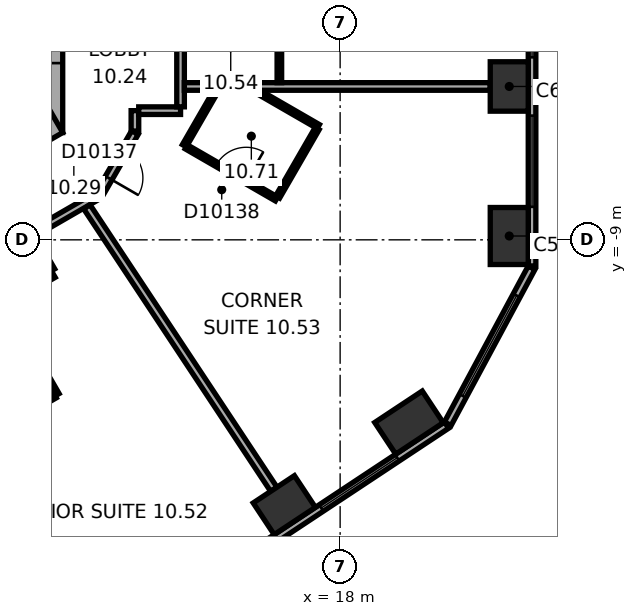
"""IFC4 building model, lengths in metres.
Left out: names, types, materials, properties, quantities, classifications, styles, units other than length and angle.
Written with IfcOpenShell. Run it as: python <this file> out.ifc"""

import sys

from ifc_helpers import new_model, si_unit, direction, frame, frame_2d, origin, origin_2d, place, context, subcontext, project, spatial, rectangle, extrude, element, fill, save


model = new_model("IFC4")
c1 = context("Model", 3, precision=1e-05, world=origin(), true_north=direction((0.0, 1.0)))
c2 = subcontext(c1, "Body", "Model", "MODEL_VIEW")
j1 = project(units=[si_unit("LENGTHUNIT", "METRE"), si_unit("PLANEANGLEUNIT", "RADIAN")], contexts=[c1])
p1 = place(None, origin())
s1 = spatial("IfcSite", under=j1, at=p1, CompositionType="ELEMENT")
p2 = place(p1, origin())
s2 = spatial("IfcBuilding", under=s1, at=p2, CompositionType="ELEMENT")
p3 = place(p2, frame((0.0, 0.0, 53.9)))
s3 = spatial("IfcBuildingStorey", under=s2, at=p3, CompositionType="ELEMENT", Elevation=53.9)
p4 = place(p3, frame((22.45, -8.899, 0.0), z_axis=(0.0, 0.0, 1.0), x_axis=(0.0, 1.0, 0.0)))
e1 = element("IfcColumn", 1, at=p4, inside=s3, PredefinedType="COLUMN", context=c2, shape_type="SweptSolid", body=[
    extrude(rectangle(XDim=1.5, YDim=1.0, at=origin_2d()), origin(), (0.0, 0.0, 1.0), 3.3),
])
for number, where, z_axis, x_axis in (
    (2, (22.45, -4.965, 0.0), (0.0, 0.0, 1.0), (0.0, 1.0, 0.0)),
    (3, (16.531, -15.981, 0.0), (0.0, 0.0, 1.0), (0.834, 0.552, 0.0)),
):
    element("IfcColumn", number, at=place(p3, frame(where, z_axis=z_axis, x_axis=x_axis)), inside=s3, PredefinedType="COLUMN", context=c2, shape_type="SweptSolid", body=[
        extrude(rectangle(XDim=1.3, YDim=1.0, at=origin_2d()), origin(), (0.0, 0.0, 1.0), 3.3),
    ])
p5 = place(p3, frame((19.812, -13.809, 0.0), z_axis=(0.0, 0.0, 1.0), x_axis=(0.833885822067, 0.551936985312, 0.0)))
e4 = element("IfcColumn", 4, at=p5, inside=s3, PredefinedType="COLUMN", context=c2, shape_type="SweptSolid", body=[
    extrude(rectangle(XDim=1.5, YDim=1.0, at=origin_2d()), origin(), (0.0, 0.0, 1.0), 3.3),
])
p6 = place(p3, frame((10.1, -6.177, 0.0), z_axis=(0.0, 0.0, 1.0), x_axis=(0.0, 1.0, 0.0)))
e5 = element("IfcWall", 5, at=p6, inside=s3, PredefinedType="SHEAR", context=c2, shape_type="SweptSolid", body=[
    extrude(rectangle(XDim=12.355, YDim=1.2, at=frame_2d((6.177, 0.0))), origin(), (0.0, 0.0, 1.0), 3.3),
])
p7 = place(p6, frame((6.378, 0.0, 0.0)))
e6 = element("IfcOpeningElement", 6, at=p7, cuts=e5, PredefinedType="OPENING", context=c2, shape_type="SweptSolid", body=[
    extrude(rectangle(XDim=1.5, YDim=2.1, at=frame_2d((0.75, 1.05))), frame((0.0, 0.61, 0.0), z_axis=(0.0, -1.0, 0.0), x_axis=(1.0, 0.0, 0.0)), (0.0, 0.0, 1.0), 1.22),
])
p8 = place(p6, frame((1.828, 0.0, 0.0)))
e7 = element("IfcOpeningElement", 7, at=p8, cuts=e5, PredefinedType="OPENING", context=c2, shape_type="SweptSolid", body=[
    extrude(rectangle(XDim=1.1, YDim=2.1, at=frame_2d((0.55, 1.05))), frame((0.0, 0.61, 0.0), z_axis=(0.0, -1.0, 0.0), x_axis=(1.0, 0.0, 0.0)), (0.0, 0.0, 1.0), 1.22),
])
p9 = place(p6, frame((4.427, 0.0, 0.0)))
e8 = element("IfcOpeningElement", 8, at=p9, cuts=e5, PredefinedType="OPENING", context=c2, shape_type="SweptSolid", body=[
    extrude(rectangle(XDim=1.1, YDim=2.1, at=frame_2d((0.55, 1.05))), frame((0.0, 0.61, 0.0), z_axis=(0.0, -1.0, 0.0), x_axis=(1.0, 0.0, 0.0)), (0.0, 0.0, 1.0), 1.22),
])
p10 = place(p3, frame((-0.3, -11.836, 0.0), z_axis=(0.0, 0.0, 1.0), x_axis=(0.866021384402, 0.500006961711, 0.0)))
e9 = element("IfcWall", 9, at=p10, inside=s3, PredefinedType="SHEAR", context=c2, shape_type="SweptSolid", body=[
    extrude(rectangle(XDim=12.355, YDim=1.2, at=frame_2d((6.178, 0.0))), origin(), (0.0, 0.0, 1.0), 3.3),
])
p11 = place(p10, frame((4.128, 0.0, 0.0)))
e10 = element("IfcOpeningElement", 10, at=p11, cuts=e9, PredefinedType="OPENING", context=c2, shape_type="SweptSolid", body=[
    extrude(rectangle(XDim=0.9, YDim=2.1, at=frame_2d((0.45, 1.05))), frame((0.0, 0.61, 0.0), z_axis=(0.0, -1.0, 0.0), x_axis=(1.0, 0.0, 0.0)), (0.0, 0.0, 1.0), 1.22),
])
p12 = place(p10, frame((7.928, 0.0, 0.0)))
e11 = element("IfcOpeningElement", 11, at=p12, cuts=e9, PredefinedType="OPENING", context=c2, shape_type="SweptSolid", body=[
    extrude(rectangle(XDim=1.1, YDim=2.1, at=frame_2d((0.55, 1.05))), frame((0.0, 0.61, 0.0), z_axis=(0.0, -1.0, 0.0), x_axis=(1.0, 0.0, 0.0)), (0.0, 0.0, 1.0), 1.22),
])
p13 = place(p3, frame((23.05, -9.687, 0.0), z_axis=(0.0, 0.0, 1.0), x_axis=(0.0, 1.0, 0.0)))
e12 = element("IfcWall", 12, at=p13, inside=s3, PredefinedType="STANDARD", context=c2, shape_type="SweptSolid", body=[
    extrude(rectangle(XDim=21.246, YDim=0.2, at=frame_2d((10.623, 0.0))), origin(), (0.0, 0.0, 1.0), 3.3),
])
p14 = place(p13, frame((1.555, 0.0, 0.8)))
e13 = element("IfcOpeningElement", 13, at=p14, cuts=e12, PredefinedType="OPENING", context=c2, shape_type="SweptSolid", body=[
    extrude(rectangle(XDim=2.4, YDim=1.7, at=frame_2d((1.2, 0.85))), frame((0.0, 0.11, 0.0), z_axis=(0.0, -1.0, 0.0), x_axis=(1.0, 0.0, 0.0)), (0.0, 0.0, 1.0), 0.22),
])
p15 = place(p13, frame((5.489, 0.0, 0.8)))
e14 = element("IfcOpeningElement", 14, at=p15, cuts=e12, PredefinedType="OPENING", context=c2, shape_type="SweptSolid", body=[
    extrude(rectangle(XDim=2.4, YDim=1.7, at=frame_2d((1.2, 0.85))), frame((0.0, 0.11, 0.0), z_axis=(0.0, -1.0, 0.0), x_axis=(1.0, 0.0, 0.0)), (0.0, 0.0, 1.0), 0.22),
])
p16 = place(p13, frame((9.424, 0.0, 0.8)))
e15 = element("IfcOpeningElement", 15, at=p16, cuts=e12, PredefinedType="OPENING", context=c2, shape_type="SweptSolid", body=[
    extrude(rectangle(XDim=2.4, YDim=1.7, at=frame_2d((1.2, 0.85))), frame((0.0, 0.11, 0.0), z_axis=(0.0, -1.0, 0.0), x_axis=(1.0, 0.0, 0.0)), (0.0, 0.0, 1.0), 0.22),
])
p17 = place(p13, frame((13.358, 0.0, 0.8)))
e16 = element("IfcOpeningElement", 16, at=p17, cuts=e12, PredefinedType="OPENING", context=c2, shape_type="SweptSolid", body=[
    extrude(rectangle(XDim=2.4, YDim=1.7, at=frame_2d((1.2, 0.85))), frame((0.0, 0.11, 0.0), z_axis=(0.0, -1.0, 0.0), x_axis=(1.0, 0.0, 0.0)), (0.0, 0.0, 1.0), 0.22),
])
p18 = place(p13, frame((17.293, 0.0, 0.8)))
e17 = element("IfcOpeningElement", 17, at=p18, cuts=e12, PredefinedType="OPENING", context=c2, shape_type="SweptSolid", body=[
    extrude(rectangle(XDim=2.4, YDim=1.7, at=frame_2d((1.2, 0.85))), frame((0.0, 0.11, 0.0), z_axis=(0.0, -1.0, 0.0), x_axis=(1.0, 0.0, 0.0)), (0.0, 0.0, 1.0), 0.22),
])
p19 = place(p3, frame((3.083, -25.601, 0.0), z_axis=(0.0, 0.0, 1.0), x_axis=(0.833884295743, 0.551939291329, 0.0)))
e18 = element("IfcWall", 18, at=p19, inside=s3, PredefinedType="STANDARD", context=c2, shape_type="SweptSolid", body=[
    extrude(rectangle(XDim=21.246, YDim=0.2, at=frame_2d((10.623, 0.0))), origin(), (0.0, 0.0, 1.0), 3.3),
])
p20 = place(p19, frame((1.553, 0.0, 0.8)))
e19 = element("IfcOpeningElement", 19, at=p20, cuts=e18, PredefinedType="OPENING", context=c2, shape_type="SweptSolid", body=[
    extrude(rectangle(XDim=2.4, YDim=1.7, at=frame_2d((1.2, 0.85))), frame((0.0, 0.11, 0.0), z_axis=(0.0, -1.0, 0.0), x_axis=(1.0, 0.0, 0.0)), (0.0, 0.0, 1.0), 0.22),
])
p21 = place(p19, frame((5.488, 0.0, 0.8)))
e20 = element("IfcOpeningElement", 20, at=p21, cuts=e18, PredefinedType="OPENING", context=c2, shape_type="SweptSolid", body=[
    extrude(rectangle(XDim=2.4, YDim=1.7, at=frame_2d((1.2, 0.85))), frame((0.0, 0.11, 0.0), z_axis=(0.0, -1.0, 0.0), x_axis=(1.0, 0.0, 0.0)), (0.0, 0.0, 1.0), 0.22),
])
p22 = place(p19, frame((9.422, 0.0, 0.8)))
e21 = element("IfcOpeningElement", 21, at=p22, cuts=e18, PredefinedType="OPENING", context=c2, shape_type="SweptSolid", body=[
    extrude(rectangle(XDim=2.4, YDim=1.7, at=frame_2d((1.2, 0.85))), frame((0.0, 0.11, 0.0), z_axis=(0.0, -1.0, 0.0), x_axis=(1.0, 0.0, 0.0)), (0.0, 0.0, 1.0), 0.22),
])
p23 = place(p19, frame((13.357, 0.0, 0.8)))
e22 = element("IfcOpeningElement", 22, at=p23, cuts=e18, PredefinedType="OPENING", context=c2, shape_type="SweptSolid", body=[
    extrude(rectangle(XDim=2.4, YDim=1.7, at=frame_2d((1.2, 0.85))), frame((0.0, 0.11, 0.0), z_axis=(0.0, -1.0, 0.0), x_axis=(1.0, 0.0, 0.0)), (0.0, 0.0, 1.0), 0.22),
])
p24 = place(p19, frame((17.291, 0.0, 0.8)))
e23 = element("IfcOpeningElement", 23, at=p24, cuts=e18, PredefinedType="OPENING", context=c2, shape_type="SweptSolid", body=[
    extrude(rectangle(XDim=2.4, YDim=1.7, at=frame_2d((1.2, 0.85))), frame((0.0, 0.11, 0.0), z_axis=(0.0, -1.0, 0.0), x_axis=(1.0, 0.0, 0.0)), (0.0, 0.0, 1.0), 0.22),
])
p25 = place(p3, frame((20.833, -13.839, 0.0), z_axis=(0.0, 0.0, 1.0), x_axis=(0.473321668581, 0.880889662813, 0.0)))
e24 = element("IfcWall", 24, at=p25, inside=s3, PredefinedType="STANDARD", context=c2, shape_type="SweptSolid", body=[
    extrude(rectangle(XDim=4.66, YDim=0.2, at=frame_2d((2.33, 0.0))), origin(), (0.0, 0.0, 1.0), 3.3),
])
p26 = place(p25, frame((0.83, 0.0, 0.8)))
e25 = element("IfcOpeningElement", 25, at=p26, cuts=e24, PredefinedType="OPENING", context=c2, shape_type="SweptSolid", body=[
    extrude(rectangle(XDim=3.0, YDim=1.7, at=frame_2d((1.5, 0.85))), frame((0.0, 0.11, 0.0), z_axis=(0.0, -1.0, 0.0), x_axis=(1.0, 0.0, 0.0)), (0.0, 0.0, 1.0), 0.22),
])
p27 = place(p3, frame((7.385, -11.673, 0.0), z_axis=(0.0, 0.0, 1.0), x_axis=(0.866037524642, 0.499979005472, 0.0)))
e26 = element("IfcWall", 26, at=p27, inside=s3, PredefinedType="PARTITIONING", context=c2, shape_type="SweptSolid", body=[
    extrude(rectangle(XDim=3.542, YDim=0.2, at=frame_2d((1.771, 0.0))), origin(), (0.0, 0.0, 1.0), 3.05),
])
p28 = place(p3, frame((9.203, -10.738, 0.0), z_axis=(0.0, 0.0, 1.0), x_axis=(0.50000943426, -0.866019956843, 0.0)))
e27 = element("IfcWall", 27, at=p28, inside=s3, PredefinedType="PARTITIONING", context=c2, shape_type="SweptSolid", body=[
    extrude(rectangle(XDim=2.7, YDim=0.12, at=frame_2d((1.35, 0.0))), origin(), (0.0, 0.0, 1.0), 3.05),
])
p29 = place(p3, frame((9.852, -8.861, 0.0), z_axis=(0.0, 0.0, 1.0), x_axis=(0.866013291437, 0.500020978615, 0.0)))
e28 = element("IfcWall", 28, at=p29, inside=s3, PredefinedType="PARTITIONING", context=c2, shape_type="SweptSolid", body=[
    extrude(rectangle(XDim=2.077, YDim=0.2, at=frame_2d((1.038, 0.0))), origin(), (0.0, 0.0, 1.0), 3.05),
])
p30 = place(p3, frame((10.402, -9.815, 0.0), z_axis=(0.0, 0.0, 1.0), x_axis=(-0.499968756647, 0.866043441391, 0.0)))
e29 = element("IfcWall", 29, at=p30, inside=s3, PredefinedType="PARTITIONING", context=c2, shape_type="SweptSolid", body=[
    extrude(rectangle(XDim=1.001, YDim=0.2, at=frame_2d((0.5, 0.0))), origin(), (0.0, 0.0, 1.0), 3.05),
])
p31 = place(p3, frame((10.501, -13.106, 0.0), z_axis=(0.0, 0.0, 1.0), x_axis=(-0.866013262469, -0.500021028785, 0.0)))
e30 = element("IfcWall", 30, at=p31, inside=s3, PredefinedType="PARTITIONING", context=c2, shape_type="SweptSolid", body=[
    extrude(rectangle(XDim=1.982, YDim=0.12, at=frame_2d((0.991, 0.0))), origin(), (0.0, 0.0, 1.0), 3.05),
])
p32 = place(p3, frame((11.67, -7.788, 0.0), z_axis=(0.0, 0.0, 1.0), x_axis=(0.500063286585, 0.865988862174, 0.0)))
e31 = element("IfcWall", 31, at=p32, inside=s3, PredefinedType="PARTITIONING", context=c2, shape_type="SweptSolid", body=[
    extrude(rectangle(XDim=1.86, YDim=0.2, at=frame_2d((0.93, 0.0))), origin(), (0.0, 0.0, 1.0), 3.05),
])
p33 = place(p32, frame((0.48, 0.0, 0.0)))
e32 = element("IfcOpeningElement", 32, at=p33, cuts=e31, PredefinedType="OPENING", context=c2, shape_type="SweptSolid", body=[
    extrude(rectangle(XDim=0.9, YDim=2.1, at=frame_2d((0.45, 1.05))), frame((0.0, 0.11, 0.0), z_axis=(0.0, -1.0, 0.0), x_axis=(1.0, 0.0, 0.0)), (0.0, 0.0, 1.0), 0.22),
])
p34 = place(p3, frame((12.6, -6.138, 0.0), z_axis=(0.0, 0.0, 1.0), x_axis=(0.0, 1.0, 0.0)))
e33 = element("IfcWall", 33, at=p34, inside=s3, PredefinedType="PARTITIONING", context=c2, shape_type="SweptSolid", body=[
    extrude(rectangle(XDim=0.537, YDim=0.2, at=frame_2d((0.268, 0.0))), origin(), (0.0, 0.0, 1.0), 3.05),
])
p35 = place(p3, frame((12.7, -5.601, 0.0), z_axis=(0.0, 0.0, 1.0), x_axis=(1.0, 0.0, 0.0)))
e34 = element("IfcWall", 34, at=p35, inside=s3, PredefinedType="PARTITIONING", context=c2, shape_type="SweptSolid", body=[
    extrude(rectangle(XDim=1.101, YDim=0.2, at=frame_2d((0.551, 0.0))), origin(), (0.0, 0.0, 1.0), 3.05),
])
p36 = place(p3, frame((13.801, -5.501, 0.0), z_axis=(0.0, 0.0, 1.0), x_axis=(0.0, 1.0, 0.0)))
e35 = element("IfcWall", 35, at=p36, inside=s3, PredefinedType="PARTITIONING", context=c2, shape_type="SweptSolid", body=[
    extrude(rectangle(XDim=5.702, YDim=0.2, at=frame_2d((2.851, 0.0))), origin(), (0.0, 0.0, 1.0), 3.05),
])
p37 = place(p36, frame((3.079, 0.0, 0.0)))
e36 = element("IfcOpeningElement", 36, at=p37, cuts=e35, PredefinedType="OPENING", context=c2, shape_type="SweptSolid", body=[
    extrude(rectangle(XDim=0.9, YDim=2.1, at=frame_2d((0.45, 1.05))), frame((0.0, 0.11, 0.0), z_axis=(0.0, -1.0, 0.0), x_axis=(1.0, 0.0, 0.0)), (0.0, 0.0, 1.0), 0.22),
])
p38 = place(p36, frame((4.636, 0.0, 0.0)))
e37 = element("IfcOpeningElement", 37, at=p38, cuts=e35, PredefinedType="OPENING", context=c2, shape_type="SweptSolid", body=[
    extrude(rectangle(XDim=0.9, YDim=2.1, at=frame_2d((0.45, 1.05))), frame((0.0, 0.11, 0.0), z_axis=(0.0, -1.0, 0.0), x_axis=(1.0, 0.0, 0.0)), (0.0, 0.0, 1.0), 0.22),
])
p39 = place(p3, frame((13.901, -6.524, 0.0), z_axis=(0.0, 0.0, 1.0), x_axis=(0.499964162598, 0.86604609353, 0.0)))
e38 = element("IfcWall", 38, at=p39, inside=s3, PredefinedType="PARTITIONING", context=c2, shape_type="SweptSolid", body=[
    extrude(rectangle(XDim=1.661, YDim=0.12, at=frame_2d((0.831, 0.0))), origin(), (0.0, 0.0, 1.0), 3.05),
])
p40 = place(p3, frame((13.901, -4.965, 0.0), z_axis=(0.0, 0.0, 1.0), x_axis=(1.0, 0.0, 0.0)))
e39 = element("IfcWall", 39, at=p40, inside=s3, PredefinedType="PARTITIONING", context=c2, shape_type="SweptSolid", body=[
    extrude(rectangle(XDim=8.049, YDim=0.2, at=frame_2d((4.024, 0.0))), origin(), (0.0, 0.0, 1.0), 3.05),
])
p41 = place(p3, frame((15.841, -5.104, 0.0), z_axis=(0.0, 0.0, 1.0), x_axis=(0.866025591402, -0.499999675036, 0.0)))
e40 = element("IfcWall", 40, at=p41, inside=s3, PredefinedType="PARTITIONING", context=c2, shape_type="SweptSolid", body=[
    extrude(rectangle(XDim=1.83, YDim=0.12, at=frame_2d((0.915, 0.0))), origin(), (0.0, 0.0, 1.0), 3.05),
])
p42 = place(p3, frame((16.255, -15.564, 0.0), z_axis=(0.0, 0.0, 1.0), x_axis=(-0.55192208744, 0.833895682562, 0.0)))
e41 = element("IfcWall", 41, at=p42, inside=s3, PredefinedType="PARTITIONING", context=c2, shape_type="SweptSolid", body=[
    extrude(rectangle(XDim=8.913, YDim=0.2, at=frame_2d((4.457, 0.0))), origin(), (0.0, 0.0, 1.0), 2.6),
])
p43 = place(p3, frame((16.326, -7.925, 0.0), z_axis=(0.0, 0.0, 1.0), x_axis=(-0.865997131366, 0.500048966069, 0.0)))
e42 = element("IfcWall", 42, at=p43, inside=s3, PredefinedType="PARTITIONING", context=c2, shape_type="SweptSolid", body=[
    extrude(rectangle(XDim=2.74, YDim=0.12, at=frame_2d((1.37, 0.0))), origin(), (0.0, 0.0, 1.0), 3.05),
])
p44 = place(p43, frame((0.92, 0.0, 0.0)))
e43 = element("IfcOpeningElement", 43, at=p44, cuts=e42, PredefinedType="OPENING", context=c2, shape_type="SweptSolid", body=[
    extrude(rectangle(XDim=0.9, YDim=2.1, at=frame_2d((0.45, 1.05))), frame((0.0, 0.07, 0.0), z_axis=(0.0, -1.0, 0.0), x_axis=(1.0, 0.0, 0.0)), (0.0, 0.0, 1.0), 0.14),
])
p45 = place(p3, frame((16.401, -3.025, 0.0), z_axis=(0.0, 0.0, 1.0), x_axis=(0.0, -1.0, 0.0)))
e44 = element("IfcWall", 44, at=p45, inside=s3, PredefinedType="PARTITIONING", context=c2, shape_type="SweptSolid", body=[
    extrude(rectangle(XDim=1.84, YDim=0.12, at=frame_2d((0.92, 0.0))), origin(), (0.0, 0.0, 1.0), 3.05),
])
p46 = place(p3, frame((17.396, -6.071, 0.0), z_axis=(0.0, 0.0, 1.0), x_axis=(-0.500027264788, -0.866009661879, 0.0)))
e45 = element("IfcWall", 45, at=p46, inside=s3, PredefinedType="PARTITIONING", context=c2, shape_type="SweptSolid", body=[
    extrude(rectangle(XDim=2.08, YDim=0.12, at=frame_2d((1.04, 0.0))), origin(), (0.0, 0.0, 1.0), 3.05),
])
p47 = place(p14, origin())
e46 = element("IfcWindow", 46, at=p47, inside=s3, PartitioningType="SINGLE_PANEL", PredefinedType="WINDOW", context=c2, shape_type="SweptSolid", body=[
    extrude(rectangle(XDim=2.4, YDim=1.7, at=frame_2d((1.2, 0.85))), frame((0.0, 0.03, 0.0), z_axis=(0.0, -1.0, 0.0), x_axis=(1.0, 0.0, 0.0)), (0.0, 0.0, 1.0), 0.06),
])
fill(e13, e46)
p48 = place(p15, origin())
e47 = element("IfcWindow", 47, at=p48, inside=s3, PartitioningType="SINGLE_PANEL", PredefinedType="WINDOW", context=c2, shape_type="SweptSolid", body=[
    extrude(rectangle(XDim=2.4, YDim=1.7, at=frame_2d((1.2, 0.85))), frame((0.0, 0.03, 0.0), z_axis=(0.0, -1.0, 0.0), x_axis=(1.0, 0.0, 0.0)), (0.0, 0.0, 1.0), 0.06),
])
fill(e14, e47)
p49 = place(p24, origin())
e48 = element("IfcWindow", 48, at=p49, inside=s3, PartitioningType="SINGLE_PANEL", PredefinedType="WINDOW", context=c2, shape_type="SweptSolid", body=[
    extrude(rectangle(XDim=2.4, YDim=1.7, at=frame_2d((1.2, 0.85))), frame((0.0, 0.03, 0.0), z_axis=(0.0, -1.0, 0.0), x_axis=(1.0, 0.0, 0.0)), (0.0, 0.0, 1.0), 0.06),
])
fill(e23, e48)
p50 = place(p26, origin())
e49 = element("IfcWindow", 49, at=p50, inside=s3, PartitioningType="SINGLE_PANEL", PredefinedType="WINDOW", context=c2, shape_type="SweptSolid", body=[
    extrude(rectangle(XDim=3.0, YDim=1.7, at=frame_2d((1.5, 0.85))), frame((0.0, 0.03, 0.0), z_axis=(0.0, -1.0, 0.0), x_axis=(1.0, 0.0, 0.0)), (0.0, 0.0, 1.0), 0.06),
])
fill(e25, e49)
p51 = place(p33, origin())
e50 = element("IfcDoor", 50, at=p51, inside=s3, OperationType="SINGLE_SWING_LEFT", PredefinedType="DOOR", context=c2, shape_type="SweptSolid", body=[
    extrude(rectangle(XDim=0.9, YDim=2.1, at=frame_2d((0.45, 1.05))), frame((0.0, 0.025, 0.0), z_axis=(0.0, -1.0, 0.0), x_axis=(1.0, 0.0, 0.0)), (0.0, 0.0, 1.0), 0.05),
])
fill(e32, e50)
p52 = place(p44, origin())
e51 = element("IfcDoor", 51, at=p52, inside=s3, OperationType="SINGLE_SWING_LEFT", PredefinedType="DOOR", context=c2, shape_type="SweptSolid", body=[
    extrude(rectangle(XDim=0.9, YDim=2.1, at=frame_2d((0.45, 1.05))), frame((0.0, 0.025, 0.0), z_axis=(0.0, -1.0, 0.0), x_axis=(1.0, 0.0, 0.0)), (0.0, 0.0, 1.0), 0.05),
])
fill(e43, e51)
save(model, sys.argv[1])
